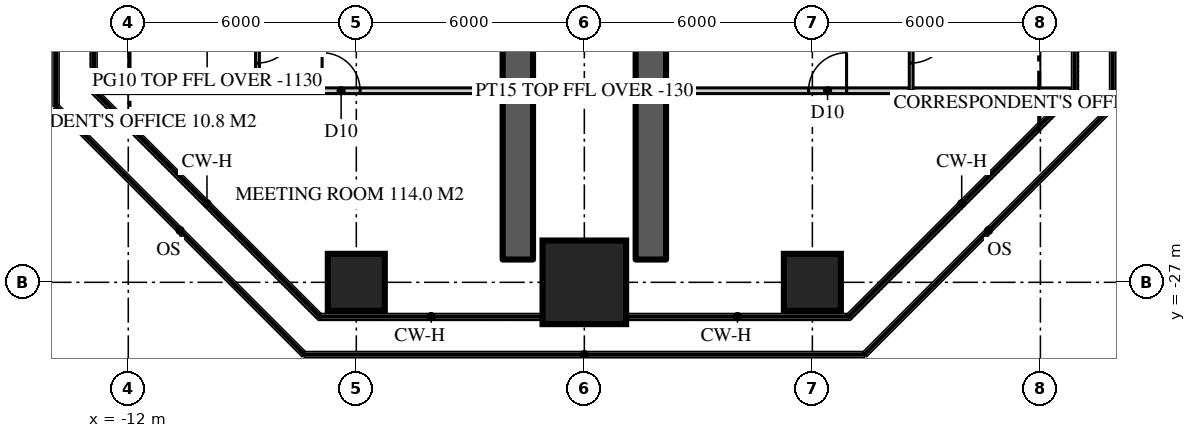
"""IFC4 building model, lengths in metres.
Left out: names, types, materials, properties, quantities, classifications, styles, units other than length and angle.
Written with IfcOpenShell. Run it as: python <this file> out.ifc"""

import sys

from ifc_helpers import new_model, si_unit, direction, frame, frame_2d, origin, origin_2d, place, context, subcontext, project, spatial, rectangle, extrude, element, fill, save


model = new_model("IFC4")
c1 = context("Model", 3, precision=1e-05, world=origin(), true_north=direction((0.0, 1.0)))
c2 = subcontext(c1, "Body", "Model", "MODEL_VIEW")
j1 = project(units=[si_unit("LENGTHUNIT", "METRE"), si_unit("PLANEANGLEUNIT", "RADIAN")], contexts=[c1])
p1 = place(None, origin())
s1 = spatial("IfcSite", under=j1, at=p1, CompositionType="ELEMENT")
p2 = place(p1, origin())
s2 = spatial("IfcBuilding", under=s1, at=p2, CompositionType="ELEMENT")
p3 = place(p2, frame((0.0, 0.0, 247.8)))
s3 = spatial("IfcBuildingStorey", under=s2, at=p3, CompositionType="ELEMENT", Elevation=247.8)
for number, where, z_axis, x_axis in (
    (1, (-1.75, -11.15, 0.0), (0.0, 0.0, 1.0), (0.0, -1.0, 0.0)),
    (2, (1.75, -11.15, 0.0), (0.0, 0.0, 1.0), (0.0, -1.0, 0.0)),
):
    element("IfcWall", number, at=place(p3, frame(where, z_axis=z_axis, x_axis=x_axis)), inside=s3, PredefinedType="SHEAR", context=c2, shape_type="SweptSolid", body=[
        extrude(rectangle(XDim=15.25, YDim=0.8, at=frame_2d((7.625, 0.0))), origin(), (0.0, 0.0, 1.0), 3.9),
    ])
p4 = place(p3, frame((-6.0, -27.0, 0.0), z_axis=(0.0, 0.0, 1.0), x_axis=(1.0, 0.0, 0.0)))
e3 = element("IfcColumn", 3, at=p4, inside=s3, PredefinedType="COLUMN", context=c2, shape_type="SweptSolid", body=[
    extrude(rectangle(XDim=1.5, YDim=1.5, at=origin_2d()), origin(), (0.0, 0.0, 1.0), 3.9),
])
p5 = place(p3, frame((0.0, -27.0, 0.0), z_axis=(0.0, 0.0, 1.0), x_axis=(1.0, 0.0, 0.0)))
e4 = element("IfcColumn", 4, at=p5, inside=s3, PredefinedType="COLUMN", context=c2, shape_type="SweptSolid", body=[
    extrude(rectangle(XDim=2.2, YDim=2.2, at=origin_2d()), origin(), (0.0, 0.0, 1.0), 3.9),
])
p6 = place(p3, frame((6.0, -27.0, 0.0), z_axis=(0.0, 0.0, 1.0), x_axis=(1.0, 0.0, 0.0)))
e5 = element("IfcColumn", 5, at=p6, inside=s3, PredefinedType="COLUMN", context=c2, shape_type="SweptSolid", body=[
    extrude(rectangle(XDim=1.5, YDim=1.5, at=origin_2d()), origin(), (0.0, 0.0, 1.0), 3.9),
])
p7 = place(p3, frame((-12.786, -21.959, 0.0), z_axis=(0.0, 0.0, 1.0), x_axis=(1.0, 0.0, 0.0)))
e6 = element("IfcWall", 6, at=p7, inside=s3, PredefinedType="PARTITIONING", context=c2, shape_type="SweptSolid", body=[
    extrude(rectangle(XDim=25.573, YDim=0.15, at=frame_2d((12.786, 0.0))), origin(), (0.0, 0.0, 1.0), 3.77),
])
p8 = place(p7, frame((18.687, 0.0, 0.0)))
e7 = element("IfcOpeningElement", 7, at=p8, cuts=e6, PredefinedType="OPENING", context=c2, shape_type="SweptSolid", body=[
    extrude(rectangle(XDim=1.0, YDim=2.2, at=frame_2d((0.5, 1.1))), frame((0.0, 0.085, 0.0), z_axis=(0.0, -1.0, 0.0), x_axis=(1.0, 0.0, 0.0)), (0.0, 0.0, 1.0), 0.17),
])
p9 = place(p7, frame((5.886, 0.0, 0.0)))
e8 = element("IfcOpeningElement", 8, at=p9, cuts=e6, PredefinedType="OPENING", context=c2, shape_type="SweptSolid", body=[
    extrude(rectangle(XDim=1.0, YDim=2.2, at=frame_2d((0.5, 1.1))), frame((0.0, 0.085, 0.0), z_axis=(0.0, -1.0, 0.0), x_axis=(1.0, 0.0, 0.0)), (0.0, 0.0, 1.0), 0.17),
])
p10 = place(p3, frame((8.6, -19.5, 0.0), z_axis=(0.0, 0.0, 1.0), x_axis=(0.0, -1.0, 0.0)))
e9 = element("IfcWall", 9, at=p10, inside=s3, PredefinedType="PARTITIONING", context=c2, shape_type="SweptSolid", body=[
    extrude(rectangle(XDim=2.459, YDim=0.1, at=frame_2d((1.229, 0.0))), origin(), (0.0, 0.0, 1.0), 3.77),
])
p11 = place(p10, frame((0.729, 0.0, 0.0)))
e10 = element("IfcOpeningElement", 10, at=p11, cuts=e9, PredefinedType="OPENING", context=c2, shape_type="SweptSolid", body=[
    extrude(rectangle(XDim=1.0, YDim=2.2, at=frame_2d((0.5, 1.1))), frame((0.0, 0.06, 0.0), z_axis=(0.0, -1.0, 0.0), x_axis=(1.0, 0.0, 0.0)), (0.0, 0.0, 1.0), 0.12),
])
p12 = place(p3, frame((-8.6, -19.5, 0.0), z_axis=(0.0, 0.0, 1.0), x_axis=(0.0, -1.0, 0.0)))
e11 = element("IfcWall", 11, at=p12, inside=s3, PredefinedType="PARTITIONING", context=c2, shape_type="SweptSolid", body=[
    extrude(rectangle(XDim=2.459, YDim=0.1, at=frame_2d((1.229, 0.0))), origin(), (0.0, 0.0, 1.0), 3.77),
])
p13 = place(p12, frame((0.729, 0.0, 0.0)))
e12 = element("IfcOpeningElement", 12, at=p13, cuts=e11, PredefinedType="OPENING", context=c2, shape_type="SweptSolid", body=[
    extrude(rectangle(XDim=1.0, YDim=2.2, at=frame_2d((0.5, 1.1))), frame((0.0, 0.06, 0.0), z_axis=(0.0, -1.0, 0.0), x_axis=(1.0, 0.0, 0.0)), (0.0, 0.0, 1.0), 0.12),
])
p14 = place(p8, origin())
e13 = element("IfcDoor", 13, at=p14, inside=s3, OperationType="SINGLE_SWING_RIGHT", PredefinedType="DOOR", context=c2, shape_type="SweptSolid", body=[
    extrude(rectangle(XDim=1.0, YDim=2.2, at=frame_2d((0.5, 1.1))), frame((0.0, 0.025, 0.0), z_axis=(0.0, -1.0, 0.0), x_axis=(1.0, 0.0, 0.0)), (0.0, 0.0, 1.0), 0.05),
])
fill(e7, e13)
p15 = place(p9, origin())
e14 = element("IfcDoor", 14, at=p15, inside=s3, OperationType="SINGLE_SWING_LEFT", PredefinedType="DOOR", context=c2, shape_type="SweptSolid", body=[
    extrude(rectangle(XDim=1.0, YDim=2.2, at=frame_2d((0.5, 1.1))), frame((0.0, 0.025, 0.0), z_axis=(0.0, -1.0, 0.0), x_axis=(1.0, 0.0, 0.0)), (0.0, 0.0, 1.0), 0.05),
])
fill(e8, e14)
p16 = place(p11, origin())
e15 = element("IfcDoor", 15, at=p16, inside=s3, OperationType="SINGLE_SWING_LEFT", PredefinedType="DOOR", context=c2, shape_type="SweptSolid", body=[
    extrude(rectangle(XDim=1.0, YDim=2.2, at=frame_2d((0.5, 1.1))), frame((0.0, 0.025, 0.0), z_axis=(0.0, -1.0, 0.0), x_axis=(1.0, 0.0, 0.0)), (0.0, 0.0, 1.0), 0.05),
])
fill(e10, e15)
p17 = place(p13, origin())
e16 = element("IfcDoor", 16, at=p17, inside=s3, OperationType="SINGLE_SWING_LEFT", PredefinedType="DOOR", context=c2, shape_type="SweptSolid", body=[
    extrude(rectangle(XDim=1.0, YDim=2.2, at=frame_2d((0.5, 1.1))), frame((0.0, 0.025, 0.0), z_axis=(0.0, -1.0, 0.0), x_axis=(1.0, 0.0, 0.0)), (0.0, 0.0, 1.0), 0.05),
])
fill(e12, e16)
save(model, sys.argv[1])
